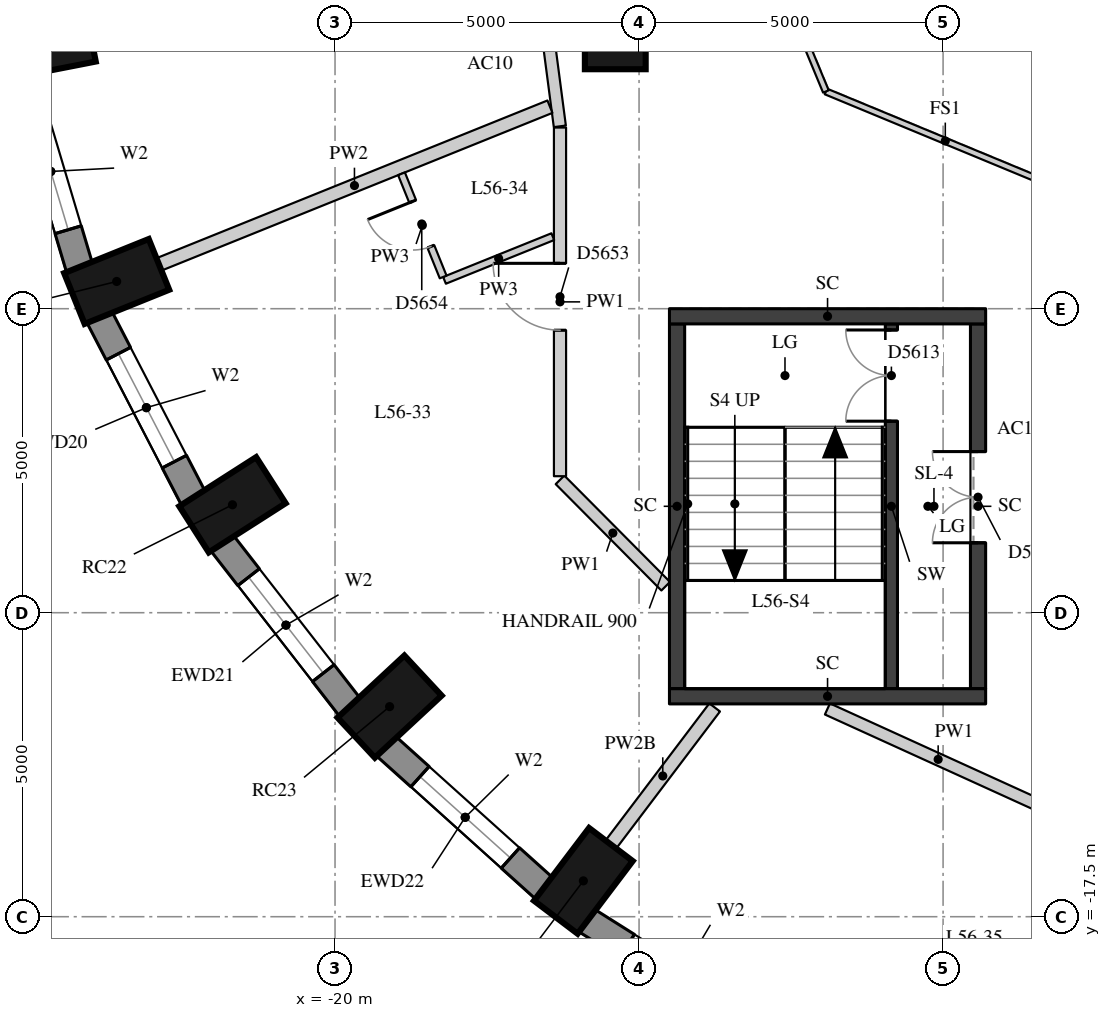
"""IFC4 building model, lengths in metres.
Left out: names, types, materials, properties, quantities, classifications, styles, units other than length and angle.
Written with IfcOpenShell. Run it as: python <this file> out.ifc"""

import sys

from ifc_helpers import new_model, si_unit, direction, frame, frame_2d, origin, origin_2d, place, context, subcontext, project, spatial, rectangle, extrude, element, fill, save


model = new_model("IFC4")
c1 = context("Model", 3, precision=1e-05, world=origin(), true_north=direction((0.0, 1.0)))
c2 = subcontext(c1, "Body", "Model", "MODEL_VIEW")
j1 = project(units=[si_unit("LENGTHUNIT", "METRE"), si_unit("PLANEANGLEUNIT", "RADIAN")], contexts=[c1])
p1 = place(None, origin())
s1 = spatial("IfcSite", under=j1, at=p1, CompositionType="ELEMENT")
p2 = place(p1, origin())
s2 = spatial("IfcBuilding", under=s1, at=p2, CompositionType="ELEMENT")
p3 = place(p2, frame((0.0, 0.0, 199.1)))
s3 = spatial("IfcBuildingStorey", under=s2, at=p3, CompositionType="ELEMENT", Elevation=199.1)
for number, where, z_axis, x_axis in (
    (1, (-24.757, -3.137, 0.0), (0.0, 0.0, 1.0), (-0.981, -0.192, 0.0)),
    (2, (-23.591, -7.052, 0.0), (0.0, 0.0, 1.0), (-0.927, -0.374, 0.0)),
    (3, (-21.687, -10.725, 0.0), (0.0, 0.0, 1.0), (-0.842, -0.539, 0.0)),
    (4, (-19.102, -14.045, 0.0), (0.0, 0.0, 1.0), (-0.732, -0.681, 0.0)),
    (5, (-15.916, -16.911, 0.0), (0.0, 0.0, 1.0), (-0.604, -0.797, 0.0)),
):
    element("IfcColumn", number, at=place(p3, frame(where, z_axis=z_axis, x_axis=x_axis)), inside=s3, PredefinedType="COLUMN", context=c2, shape_type="SweptSolid", body=[
        extrude(rectangle(XDim=1.5, YDim=0.9, at=origin_2d()), origin(), (0.0, 0.0, 1.0), 3.3),
    ])
p4 = place(p3, frame((-15.391, -3.062, 0.0), z_axis=(0.0, 0.0, 1.0), x_axis=(1.0, 0.0, 0.0)))
e6 = element("IfcColumn", 6, at=p4, inside=s3, PredefinedType="COLUMN", context=c2, shape_type="SweptSolid", body=[
    extrude(rectangle(XDim=1.0, YDim=1.0, at=origin_2d()), origin(), (0.0, 0.0, 1.0), 3.3),
])
p5 = place(p3, frame((-25.148, -3.652, 0.0), z_axis=(0.0, 0.0, 1.0), x_axis=(0.285444972963, -0.958395099847, 0.0)))
e7 = element("IfcWall", 7, at=p5, inside=s3, PredefinedType="SOLIDWALL", context=c2, shape_type="SweptSolid", body=[
    extrude(rectangle(XDim=3.32, YDim=0.45, at=frame_2d((1.66, 0.0))), origin(), (0.0, 0.0, 1.0), 3.02),
])
p6 = place(p5, frame((0.66, 0.0, 0.4)))
e8 = element("IfcOpeningElement", 8, at=p6, cuts=e7, PredefinedType="OPENING", context=c2, shape_type="SweptSolid", body=[
    extrude(rectangle(XDim=2.0, YDim=1.75, at=frame_2d((1.0, 0.875))), frame((0.0, 0.235, 0.0), z_axis=(0.0, -1.0, 0.0), x_axis=(1.0, 0.0, 0.0)), (0.0, 0.0, 1.0), 0.47),
])
p7 = place(p3, frame((-23.878, -7.632, 0.0), z_axis=(0.0, 0.0, 1.0), x_axis=(0.460232593174, -0.887798378113, 0.0)))
e9 = element("IfcWall", 9, at=p7, inside=s3, PredefinedType="SOLIDWALL", context=c2, shape_type="SweptSolid", body=[
    extrude(rectangle(XDim=3.371, YDim=0.45, at=frame_2d((1.685, 0.0))), origin(), (0.0, 0.0, 1.0), 3.02),
])
p8 = place(p7, frame((0.685, 0.0, 0.4)))
e10 = element("IfcOpeningElement", 10, at=p8, cuts=e9, PredefinedType="OPENING", context=c2, shape_type="SweptSolid", body=[
    extrude(rectangle(XDim=2.0, YDim=1.75, at=frame_2d((1.0, 0.875))), frame((0.0, 0.235, 0.0), z_axis=(0.0, -1.0, 0.0), x_axis=(1.0, 0.0, 0.0)), (0.0, 0.0, 1.0), 0.47),
])
p9 = place(p3, frame((-21.863, -11.348, 0.0), z_axis=(0.0, 0.0, 1.0), x_axis=(0.614255239631, -0.789107407509, 0.0)))
e11 = element("IfcWall", 11, at=p9, inside=s3, PredefinedType="SOLIDWALL", context=c2, shape_type="SweptSolid", body=[
    extrude(rectangle(XDim=3.438, YDim=0.45, at=frame_2d((1.719, 0.0))), origin(), (0.0, 0.0, 1.0), 3.02),
])
p10 = place(p9, frame((0.719, 0.0, 0.4)))
e12 = element("IfcOpeningElement", 12, at=p10, cuts=e11, PredefinedType="OPENING", context=c2, shape_type="SweptSolid", body=[
    extrude(rectangle(XDim=2.0, YDim=1.75, at=frame_2d((1.0, 0.875))), frame((0.0, 0.235, 0.0), z_axis=(0.0, -1.0, 0.0), x_axis=(1.0, 0.0, 0.0)), (0.0, 0.0, 1.0), 0.47),
])
p11 = place(p3, frame((-19.165, -14.69, 0.0), z_axis=(0.0, 0.0, 1.0), x_axis=(0.743442727602, -0.668799604348, 0.0)))
e13 = element("IfcWall", 13, at=p11, inside=s3, PredefinedType="SOLIDWALL", context=c2, shape_type="SweptSolid", body=[
    extrude(rectangle(XDim=3.513, YDim=0.45, at=frame_2d((1.756, 0.0))), origin(), (0.0, 0.0, 1.0), 3.02),
])
p12 = place(p11, frame((0.756, 0.0, 0.4)))
e14 = element("IfcOpeningElement", 14, at=p12, cuts=e13, PredefinedType="OPENING", context=c2, shape_type="SweptSolid", body=[
    extrude(rectangle(XDim=2.0, YDim=1.75, at=frame_2d((1.0, 0.875))), frame((0.0, 0.235, 0.0), z_axis=(0.0, -1.0, 0.0), x_axis=(1.0, 0.0, 0.0)), (0.0, 0.0, 1.0), 0.47),
])
p13 = place(p3, frame((-15.867, -17.559, 0.0), z_axis=(0.0, 0.0, 1.0), x_axis=(0.84616917791, -0.532914366813, 0.0)))
e15 = element("IfcWall", 15, at=p13, inside=s3, PredefinedType="SOLIDWALL", context=c2, shape_type="SweptSolid", body=[
    extrude(rectangle(XDim=3.587, YDim=0.45, at=frame_2d((1.793, 0.0))), origin(), (0.0, 0.0, 1.0), 3.02),
])
p14 = place(p13, frame((0.793, 0.0, 0.4)))
e16 = element("IfcOpeningElement", 16, at=p14, cuts=e15, PredefinedType="OPENING", context=c2, shape_type="SweptSolid", body=[
    extrude(rectangle(XDim=2.0, YDim=1.75, at=frame_2d((1.0, 0.875))), frame((0.0, 0.235, 0.0), z_axis=(0.0, -1.0, 0.0), x_axis=(1.0, 0.0, 0.0)), (0.0, 0.0, 1.0), 0.47),
])
p15 = place(p3, frame((-10.85, -13.75, 0.0), z_axis=(0.0, 0.0, 1.0), x_axis=(0.0, 1.0, 0.0)))
e17 = element("IfcWall", 17, at=p15, inside=s3, PredefinedType="SHEAR", context=c2, shape_type="SweptSolid", body=[
    extrude(rectangle(XDim=6.0, YDim=0.2, at=frame_2d((3.0, 0.0))), origin(), (0.0, 0.0, 1.0), 3.02),
])
p16 = place(p15, frame((4.4, 0.0, 0.0)))
e18 = element("IfcOpeningElement", 18, at=p16, cuts=e17, PredefinedType="OPENING", context=c2, shape_type="SweptSolid", body=[
    extrude(rectangle(XDim=1.5, YDim=2.1, at=frame_2d((0.75, 1.05))), frame((0.0, 0.11, 0.0), z_axis=(0.0, -1.0, 0.0), x_axis=(1.0, 0.0, 0.0)), (0.0, 0.0, 1.0), 0.22),
])
p17 = place(p3, frame((-14.375, -13.75, -0.28), z_axis=(0.0, 0.0, 1.0), x_axis=(0.0, 1.0, 0.0)))
e19 = element("IfcWall", 19, at=p17, inside=s3, PredefinedType="SHEAR", context=c2, shape_type="SweptSolid", body=[
    extrude(rectangle(XDim=6.0, YDim=0.25, at=frame_2d((3.0, 0.0))), origin(), (0.0, 0.0, 1.0), 3.3),
])
p18 = place(p3, frame((-9.425, -13.75, -0.28), z_axis=(0.0, 0.0, 1.0), x_axis=(0.0, 1.0, 0.0)))
e20 = element("IfcWall", 20, at=p18, inside=s3, PredefinedType="SHEAR", context=c2, shape_type="SweptSolid", body=[
    extrude(rectangle(XDim=6.0, YDim=0.25, at=frame_2d((3.0, 0.0))), origin(), (0.0, 0.0, 1.0), 3.3),
])
p19 = place(p18, frame((2.4, 0.0, 0.28)))
e21 = element("IfcOpeningElement", 21, at=p19, cuts=e20, PredefinedType="OPENING", context=c2, shape_type="SweptSolid", body=[
    extrude(rectangle(XDim=1.5, YDim=2.1, at=frame_2d((0.75, 1.05))), frame((0.0, 0.135, 0.0), z_axis=(0.0, -1.0, 0.0), x_axis=(1.0, 0.0, 0.0)), (0.0, 0.0, 1.0), 0.27),
])
for number, where, z_axis, x_axis in (
    (22, (-14.5, -7.625, -0.28), (0.0, 0.0, 1.0), (1.0, 0.0, 0.0)),
    (23, (-14.5, -13.875, -0.28), (0.0, 0.0, 1.0), (1.0, 0.0, 0.0)),
):
    element("IfcWall", number, at=place(p3, frame(where, z_axis=z_axis, x_axis=x_axis)), inside=s3, PredefinedType="SHEAR", context=c2, shape_type="SweptSolid", body=[
        extrude(rectangle(XDim=5.2, YDim=0.25, at=frame_2d((2.6, 0.0))), origin(), (0.0, 0.0, 1.0), 3.3),
    ])
p20 = place(p3, frame((-8.26, -15.742, 0.0), z_axis=(0.0, 0.0, 1.0), x_axis=(-0.910075871217, 0.414441683025, 0.0)))
e24 = element("IfcWall", 24, at=p20, inside=s3, PredefinedType="PARTITIONING", context=c2, shape_type="SweptSolid", body=[
    extrude(rectangle(XDim=4.002, YDim=0.2, at=frame_2d((2.001, 0.0))), origin(), (0.0, 0.0, 1.0), 3.02),
])
p21 = place(p3, frame((-14.562, -12.064, 0.0), z_axis=(0.0, 0.0, 1.0), x_axis=(-0.704826289083, 0.709379942074, 0.0)))
e25 = element("IfcWall", 25, at=p21, inside=s3, PredefinedType="PARTITIONING", context=c2, shape_type="SweptSolid", body=[
    extrude(rectangle(XDim=2.466, YDim=0.2, at=frame_2d((1.233, 0.0))), origin(), (0.0, 0.0, 1.0), 3.02),
])
p22 = place(p3, frame((-16.3, -10.255, 0.0), z_axis=(0.0, 0.0, 1.0), x_axis=(0.0, 1.0, 0.0)))
e26 = element("IfcWall", 26, at=p22, inside=s3, PredefinedType="PARTITIONING", context=c2, shape_type="SweptSolid", body=[
    extrude(rectangle(XDim=5.734, YDim=0.2, at=frame_2d((2.867, 0.0))), origin(), (0.0, 0.0, 1.0), 3.02),
])
p23 = place(p22, frame((2.401, 0.0, 0.0)))
e27 = element("IfcOpeningElement", 27, at=p23, cuts=e26, PredefinedType="OPENING", context=c2, shape_type="SweptSolid", body=[
    extrude(rectangle(XDim=1.1, YDim=2.1, at=frame_2d((0.55, 1.05))), frame((0.0, 0.11, 0.0), z_axis=(0.0, -1.0, 0.0), x_axis=(1.0, 0.0, 0.0)), (0.0, 0.0, 1.0), 0.22),
])
p24 = place(p3, frame((-16.303, -4.501, 0.0), z_axis=(0.0, 0.0, 1.0), x_axis=(-0.130191522351, 0.991488864036, 0.0)))
e28 = element("IfcWall", 28, at=p24, inside=s3, PredefinedType="PARTITIONING", context=c2, shape_type="SweptSolid", body=[
    extrude(rectangle(XDim=8.045, YDim=0.2, at=frame_2d((4.022, 0.0))), origin(), (0.0, 0.0, 1.0), 3.02),
])
p25 = place(p24, frame((2.738, 0.0, 0.0)))
e29 = element("IfcOpeningElement", 29, at=p25, cuts=e28, PredefinedType="OPENING", context=c2, shape_type="SweptSolid", body=[
    extrude(rectangle(XDim=0.9, YDim=2.1, at=frame_2d((0.45, 1.05))), frame((0.0, 0.11, 0.0), z_axis=(0.0, -1.0, 0.0), x_axis=(1.0, 0.0, 0.0)), (0.0, 0.0, 1.0), 0.22),
])
p26 = place(p3, frame((-22.896, -6.771, 0.0), z_axis=(0.0, 0.0, 1.0), x_axis=(0.927377440276, 0.374127095073, 0.0)))
e30 = element("IfcWall", 30, at=p26, inside=s3, PredefinedType="PARTITIONING", context=c2, shape_type="SweptSolid", body=[
    extrude(rectangle(XDim=6.933, YDim=0.22, at=frame_2d((3.467, 0.0))), origin(), (0.0, 0.0, 1.0), 3.02),
])
p27 = place(p3, frame((-15.463, -16.312, 0.0), z_axis=(0.0, 0.0, 1.0), x_axis=(0.603613294085, 0.797277236101, 0.0)))
e31 = element("IfcWall", 31, at=p27, inside=s3, PredefinedType="PARTITIONING", context=c2, shape_type="SweptSolid", body=[
    extrude(rectangle(XDim=2.828, YDim=0.22, at=frame_2d((1.414, 0.0))), origin(), (0.0, 0.0, 1.0), 2.57),
])
p28 = place(p3, frame((-16.419, -6.315, 0.0), z_axis=(0.0, 0.0, 1.0), x_axis=(-0.927358946461, -0.374172933841, 0.0)))
e32 = element("IfcWall", 32, at=p28, inside=s3, PredefinedType="PARTITIONING", context=c2, shape_type="SweptSolid", body=[
    extrude(rectangle(XDim=1.92, YDim=0.12, at=frame_2d((0.96, 0.0))), origin(), (0.0, 0.0, 1.0), 3.02),
])
p29 = place(p3, frame((-18.222, -6.978, 0.0), z_axis=(0.0, 0.0, 1.0), x_axis=(-0.374218187905, 0.927340685963, 0.0)))
e33 = element("IfcWall", 33, at=p29, inside=s3, PredefinedType="PARTITIONING", context=c2, shape_type="SweptSolid", body=[
    extrude(rectangle(XDim=1.83, YDim=0.12, at=frame_2d((0.915, 0.0))), origin(), (0.0, 0.0, 1.0), 3.02),
])
p30 = place(p29, frame((0.54, 0.0, 0.0)))
e34 = element("IfcOpeningElement", 34, at=p30, cuts=e33, PredefinedType="OPENING", context=c2, shape_type="SweptSolid", body=[
    extrude(rectangle(XDim=0.8, YDim=2.1, at=frame_2d((0.4, 1.05))), frame((0.0, 0.07, 0.0), z_axis=(0.0, -1.0, 0.0), x_axis=(1.0, 0.0, 0.0)), (0.0, 0.0, 1.0), 0.14),
])
for number, where, z_axis, x_axis in (
    (35, (-8.0, -5.554, 0.0), (0.0, 0.0, 1.0), (-0.924, 0.383, 0.0)),
    (36, (-11.927, -3.927, 0.0), (0.0, 0.0, 1.0), (-0.383, 0.924, 0.0)),
):
    element("IfcWall", number, at=place(p3, frame(where, z_axis=z_axis, x_axis=x_axis)), inside=s3, PredefinedType="PARTITIONING", context=c2, shape_type="SweptSolid", body=[
        extrude(rectangle(XDim=4.251, YDim=0.1, at=frame_2d((2.125, 0.0))), origin(), (0.0, 0.0, 1.0), 3.02),
    ])
p31 = place(p6, origin())
e37 = element("IfcWindow", 37, at=p31, inside=s3, PartitioningType="SINGLE_PANEL", PredefinedType="WINDOW", context=c2, shape_type="SweptSolid", body=[
    extrude(rectangle(XDim=2.0, YDim=1.75, at=frame_2d((1.0, 0.875))), frame((0.0, 0.035, 0.0), z_axis=(0.0, -1.0, 0.0), x_axis=(1.0, 0.0, 0.0)), (0.0, 0.0, 1.0), 0.06),
])
fill(e8, e37)
p32 = place(p8, origin())
e38 = element("IfcWindow", 38, at=p32, inside=s3, PartitioningType="SINGLE_PANEL", PredefinedType="WINDOW", context=c2, shape_type="SweptSolid", body=[
    extrude(rectangle(XDim=2.0, YDim=1.75, at=frame_2d((1.0, 0.875))), frame((0.0, 0.035, 0.0), z_axis=(0.0, -1.0, 0.0), x_axis=(1.0, 0.0, 0.0)), (0.0, 0.0, 1.0), 0.06),
])
fill(e10, e38)
p33 = place(p10, origin())
e39 = element("IfcWindow", 39, at=p33, inside=s3, PartitioningType="SINGLE_PANEL", PredefinedType="WINDOW", context=c2, shape_type="SweptSolid", body=[
    extrude(rectangle(XDim=2.0, YDim=1.75, at=frame_2d((1.0, 0.875))), frame((0.0, 0.035, 0.0), z_axis=(0.0, -1.0, 0.0), x_axis=(1.0, 0.0, 0.0)), (0.0, 0.0, 1.0), 0.06),
])
fill(e12, e39)
p34 = place(p12, origin())
e40 = element("IfcWindow", 40, at=p34, inside=s3, PartitioningType="SINGLE_PANEL", PredefinedType="WINDOW", context=c2, shape_type="SweptSolid", body=[
    extrude(rectangle(XDim=2.0, YDim=1.75, at=frame_2d((1.0, 0.875))), frame((0.0, 0.035, 0.0), z_axis=(0.0, -1.0, 0.0), x_axis=(1.0, 0.0, 0.0)), (0.0, 0.0, 1.0), 0.06),
])
fill(e14, e40)
p35 = place(p16, origin())
e41 = element("IfcDoor", 41, at=p35, inside=s3, OperationType="DOUBLE_DOOR_SINGLE_SWING", PredefinedType="DOOR", context=c2, shape_type="SweptSolid", body=[
    extrude(rectangle(XDim=1.5, YDim=2.1, at=frame_2d((0.75, 1.05))), frame((0.0, 0.025, 0.0), z_axis=(0.0, -1.0, 0.0), x_axis=(1.0, 0.0, 0.0)), (0.0, 0.0, 1.0), 0.05),
])
fill(e18, e41)
p36 = place(p19, origin())
e42 = element("IfcDoor", 42, at=p36, inside=s3, OperationType="DOUBLE_DOOR_SINGLE_SWING", PredefinedType="DOOR", context=c2, shape_type="SweptSolid", body=[
    extrude(rectangle(XDim=1.5, YDim=2.1, at=frame_2d((0.75, 1.05))), frame((0.0, 0.025, 0.0), z_axis=(0.0, -1.0, 0.0), x_axis=(1.0, 0.0, 0.0)), (0.0, 0.0, 1.0), 0.05),
])
fill(e21, e42)
p37 = place(p23, origin())
e43 = element("IfcDoor", 43, at=p37, inside=s3, OperationType="SINGLE_SWING_RIGHT", PredefinedType="DOOR", context=c2, shape_type="SweptSolid", body=[
    extrude(rectangle(XDim=1.1, YDim=2.1, at=frame_2d((0.55, 1.05))), frame((0.0, 0.025, 0.0), z_axis=(0.0, -1.0, 0.0), x_axis=(1.0, 0.0, 0.0)), (0.0, 0.0, 1.0), 0.05),
])
fill(e27, e43)
p38 = place(p30, origin())
e44 = element("IfcDoor", 44, at=p38, inside=s3, OperationType="SINGLE_SWING_RIGHT", PredefinedType="DOOR", context=c2, shape_type="SweptSolid", body=[
    extrude(rectangle(XDim=0.8, YDim=2.1, at=frame_2d((0.4, 1.05))), frame((0.0, 0.025, 0.0), z_axis=(0.0, -1.0, 0.0), x_axis=(1.0, 0.0, 0.0)), (0.0, 0.0, 1.0), 0.05),
])
fill(e34, e44)
save(model, sys.argv[1])
